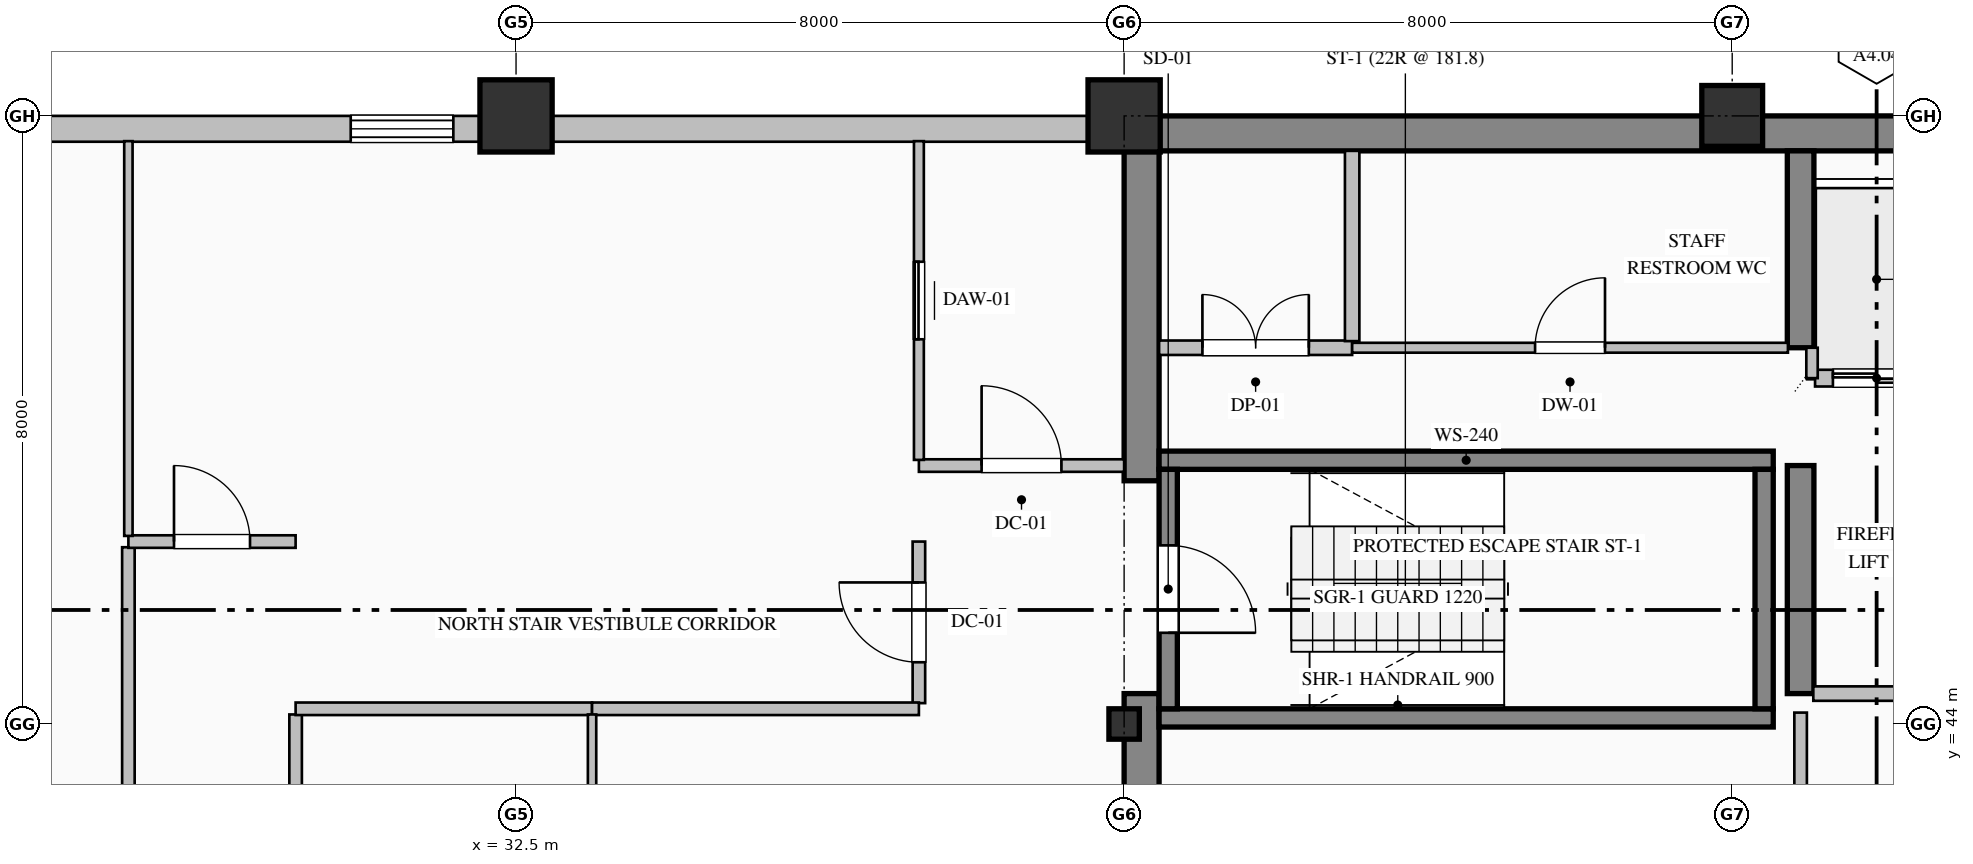
"""IFC4 building model, lengths in metres.
Left out: names, types, materials, properties, quantities, classifications, styles, units other than length and angle.
Written with IfcOpenShell. Run it as: python <this file> out.ifc"""

import sys

from ifc_helpers import new_model, si_unit, direction, frame, frame_2d, origin, origin_2d, place, context, subcontext, project, spatial, rectangle, hollow_rectangle, i_section, extrude, element, fill, save


model = new_model("IFC4")
c1 = context("Model", 3, precision=1e-05, world=origin(), true_north=direction((0.0, 1.0)))
c2 = subcontext(c1, "Body", "Model", "MODEL_VIEW")
j1 = project(units=[si_unit("LENGTHUNIT", "METRE"), si_unit("PLANEANGLEUNIT", "RADIAN")], contexts=[c1])
p1 = place(None, origin())
s1 = spatial("IfcSite", under=j1, at=p1, CompositionType="ELEMENT")
p2 = place(p1, origin())
s2 = spatial("IfcBuilding", under=s1, at=p2, CompositionType="ELEMENT")
p3 = place(p2, frame((0.0, 0.0, 277.8)))
s3 = spatial("IfcBuildingStorey", under=s2, at=p3, CompositionType="ELEMENT", Elevation=277.8)
p4 = place(p3, frame((40.5, 51.77, 0.0), z_axis=(0.0, 0.0, 1.0), x_axis=(1.0, 0.0, 0.0)))
e1 = element("IfcWall", 1, at=p4, inside=s3, PredefinedType="SHEAR", context=c2, shape_type="SweptSolid", body=[
    extrude(rectangle(XDim=23.5, YDim=0.46, at=frame_2d((11.75, 0.0))), origin(), (0.0, 0.0, 1.0), 3.65),
])
p5 = place(p3, frame((40.73, 36.46, 0.0), z_axis=(0.0, 0.0, 1.0), x_axis=(0.0, 1.0, 0.0)))
e2 = element("IfcWall", 2, at=p5, inside=s3, PredefinedType="SHEAR", context=c2, shape_type="SweptSolid", body=[
    extrude(rectangle(XDim=7.94, YDim=0.46, at=frame_2d((3.97, 0.0))), origin(), (0.0, 0.0, 1.0), 3.65),
])
p6 = place(p3, frame((40.73, 47.2, 0.0), z_axis=(0.0, 0.0, 1.0), x_axis=(0.0, 1.0, 0.0)))
e3 = element("IfcWall", 3, at=p6, inside=s3, PredefinedType="SHEAR", context=c2, shape_type="SweptSolid", body=[
    extrude(rectangle(XDim=4.34, YDim=0.46, at=frame_2d((2.17, 0.0))), origin(), (0.0, 0.0, 1.0), 3.65),
])
p7 = place(p3, frame((49.4, 44.4, 0.0), z_axis=(0.0, 0.0, 1.0), x_axis=(0.0, 1.0, 0.0)))
e4 = element("IfcWall", 4, at=p7, inside=s3, PredefinedType="SHEAR", context=c2, shape_type="SweptSolid", body=[
    extrude(rectangle(XDim=3.0, YDim=0.35, at=frame_2d((1.5, 0.0))), origin(), (0.0, 0.0, 1.0), 3.65),
])
p8 = place(p3, frame((49.4, 48.95, 0.0), z_axis=(0.0, 0.0, 1.0), x_axis=(0.0, 1.0, 0.0)))
e5 = element("IfcWall", 5, at=p8, inside=s3, PredefinedType="SHEAR", context=c2, shape_type="SweptSolid", body=[
    extrude(rectangle(XDim=2.59, YDim=0.35, at=frame_2d((1.295, 0.0))), origin(), (0.0, 0.0, 1.0), 3.65),
])
p9 = place(p3, frame((32.5, 52.0, 0.0), z_axis=(0.0, 0.0, 1.0), x_axis=(1.0, 0.0, 0.0)))
e6 = element("IfcColumn", 6, at=p9, inside=s3, PredefinedType="COLUMN", context=c2, shape_type="SweptSolid", body=[
    extrude(hollow_rectangle(XDim=0.95, YDim=0.95, WallThickness=0.036, at=origin_2d()), origin(), (0.0, 0.0, 1.0), 4.0),
])
p10 = place(p3, frame((40.5, 44.0, 0.0), z_axis=(0.0, 0.0, 1.0), x_axis=(1.0, 0.0, 0.0)))
e7 = element("IfcColumn", 7, at=p10, inside=s3, PredefinedType="COLUMN", context=c2, shape_type="SweptSolid", body=[
    extrude(i_section(OverallWidth=0.4, OverallDepth=0.4, WebThickness=0.013, FlangeThickness=0.021, FilletRadius=0.022, at=origin_2d()), origin(), (0.0, 0.0, 1.0), 4.0),
])
p11 = place(p3, frame((40.5, 52.0, 0.0), z_axis=(0.0, 0.0, 1.0), x_axis=(1.0, 0.0, 0.0)))
e8 = element("IfcColumn", 8, at=p11, inside=s3, PredefinedType="COLUMN", context=c2, shape_type="SweptSolid", body=[
    extrude(hollow_rectangle(XDim=0.95, YDim=0.95, WallThickness=0.036, at=origin_2d()), origin(), (0.0, 0.0, 1.0), 4.0),
])
p12 = place(p3, frame((48.5, 52.0, 0.0), z_axis=(0.0, 0.0, 1.0), x_axis=(1.0, 0.0, 0.0)))
e9 = element("IfcColumn", 9, at=p12, inside=s3, PredefinedType="COLUMN", context=c2, shape_type="SweptSolid", body=[
    extrude(hollow_rectangle(XDim=0.8, YDim=0.8, WallThickness=0.032, at=origin_2d()), origin(), (0.0, 0.0, 1.0), 4.0),
])
p13 = place(p3, frame((13.0, 51.83, 0.0), z_axis=(0.0, 0.0, 1.0), x_axis=(1.0, 0.0, 0.0)))
e10 = element("IfcWall", 10, at=p13, inside=s3, PredefinedType="SOLIDWALL", context=c2, shape_type="SweptSolid", body=[
    extrude(rectangle(XDim=27.52, YDim=0.34, at=frame_2d((13.76, 0.0))), origin(), (0.0, 0.0, 1.0), 3.2),
])
p14 = place(p13, frame((6.525, 0.0, 0.9)))
e11 = element("IfcOpeningElement", 11, at=p14, cuts=e10, PredefinedType="OPENING", context=c2, shape_type="SweptSolid", body=[
    extrude(rectangle(XDim=1.35, YDim=1.85, at=frame_2d((0.675, 0.925))), frame((0.0, 0.18, 0.0), z_axis=(0.0, -1.0, 0.0), x_axis=(1.0, 0.0, 0.0)), (0.0, 0.0, 1.0), 0.36),
])
p15 = place(p13, frame((17.325, 0.0, 0.9)))
e12 = element("IfcOpeningElement", 12, at=p15, cuts=e10, PredefinedType="OPENING", context=c2, shape_type="SweptSolid", body=[
    extrude(rectangle(XDim=1.35, YDim=1.85, at=frame_2d((0.675, 0.925))), frame((0.0, 0.18, 0.0), z_axis=(0.0, -1.0, 0.0), x_axis=(1.0, 0.0, 0.0)), (0.0, 0.0, 1.0), 0.36),
])
for number, where, z_axis, x_axis in (
    (13, (40.96, 47.47, 0.0), (0.0, 0.0, 1.0), (1.0, 0.0, 0.0)),
    (14, (49.04, 44.08, 0.0), (0.0, 0.0, 1.0), (-1.0, 0.0, 0.0)),
):
    element("IfcWall", number, at=place(p3, frame(where, z_axis=z_axis, x_axis=x_axis)), inside=s3, PredefinedType="SOLIDWALL", context=c2, shape_type="SweptSolid", body=[
        extrude(rectangle(XDim=8.08, YDim=0.24, at=frame_2d((4.04, 0.0))), origin(), (0.0, 0.0, 1.0), 4.0),
    ])
p16 = place(p3, frame((41.08, 47.35, 0.0), z_axis=(0.0, 0.0, 1.0), x_axis=(0.0, -1.0, 0.0)))
e15 = element("IfcWall", 15, at=p16, inside=s3, PredefinedType="SOLIDWALL", context=c2, shape_type="SweptSolid", body=[
    extrude(rectangle(XDim=3.15, YDim=0.24, at=frame_2d((1.575, 0.0))), origin(), (0.0, 0.0, 1.0), 4.0),
])
p17 = place(p16, frame((1.0, 0.0, 0.0)))
e16 = element("IfcOpeningElement", 16, at=p17, cuts=e15, PredefinedType="OPENING", context=c2, shape_type="SweptSolid", body=[
    extrude(rectangle(XDim=1.15, YDim=2.2, at=frame_2d((0.575, 1.1))), frame((0.0, 0.13, 0.0), z_axis=(0.0, -1.0, 0.0), x_axis=(1.0, 0.0, 0.0)), (0.0, 0.0, 1.0), 0.26),
])
p18 = place(p3, frame((48.92, 44.2, 0.0), z_axis=(0.0, 0.0, 1.0), x_axis=(0.0, 1.0, 0.0)))
e17 = element("IfcWall", 17, at=p18, inside=s3, PredefinedType="SOLIDWALL", context=c2, shape_type="SweptSolid", body=[
    extrude(rectangle(XDim=3.15, YDim=0.24, at=frame_2d((1.575, 0.0))), origin(), (0.0, 0.0, 1.0), 4.0),
])
p19 = place(p3, frame((54.71, 48.55, 0.0), z_axis=(0.0, 0.0, 1.0), x_axis=(-1.0, 0.0, 0.0)))
e18 = element("IfcWall", 18, at=p19, inside=s3, PredefinedType="PARTITIONING", context=c2, shape_type="SweptSolid", body=[
    extrude(rectangle(XDim=5.12, YDim=0.22, at=frame_2d((2.56, 0.0))), origin(), (0.0, 0.0, 1.0), 3.65),
])
p20 = place(p19, frame((3.735, 0.0, 0.0)))
e19 = element("IfcOpeningElement", 19, at=p20, cuts=e18, PredefinedType="OPENING", context=c2, shape_type="SweptSolid", body=[
    extrude(rectangle(XDim=1.15, YDim=2.2, at=frame_2d((0.575, 1.1))), frame((0.0, 0.12, 0.0), z_axis=(0.0, -1.0, 0.0), x_axis=(1.0, 0.0, 0.0)), (0.0, 0.0, 1.0), 0.24),
])
p21 = place(p19, frame((0.935, 0.0, 0.0)))
e20 = element("IfcOpeningElement", 20, at=p21, cuts=e18, PredefinedType="OPENING", context=c2, shape_type="SweptSolid", body=[
    extrude(rectangle(XDim=1.15, YDim=2.2, at=frame_2d((0.575, 1.1))), frame((0.0, 0.12, 0.0), z_axis=(0.0, -1.0, 0.0), x_axis=(1.0, 0.0, 0.0)), (0.0, 0.0, 1.0), 0.24),
])
p22 = place(p3, frame((49.55, 48.55, 0.0), z_axis=(0.0, 0.0, 1.0), x_axis=(0.0, 1.0, 0.0)))
e21 = element("IfcWall", 21, at=p22, inside=s3, PredefinedType="PARTITIONING", context=c2, shape_type="SweptSolid", body=[
    extrude(rectangle(XDim=0.4, YDim=0.15, at=frame_2d((0.2, 0.0))), origin(), (0.0, 0.0, 1.0), 3.65),
])
p23 = place(p3, frame((37.8, 47.4, 0.0), z_axis=(0.0, 0.0, 1.0), x_axis=(1.0, 0.0, 0.0)))
e22 = element("IfcWall", 22, at=p23, inside=s3, PredefinedType="PARTITIONING", context=c2, shape_type="SweptSolid", body=[
    extrude(rectangle(XDim=2.7, YDim=0.165, at=frame_2d((1.35, 0.0))), origin(), (0.0, 0.0, 1.0), 3.65),
])
p24 = place(p23, frame((0.825, 0.0, 0.0)))
e23 = element("IfcOpeningElement", 23, at=p24, cuts=e22, PredefinedType="OPENING", context=c2, shape_type="SweptSolid", body=[
    extrude(rectangle(XDim=1.05, YDim=2.15, at=frame_2d((0.525, 1.075))), frame((0.0, 0.093, 0.0), z_axis=(0.0, -1.0, 0.0), x_axis=(1.0, 0.0, 0.0)), (0.0, 0.0, 1.0), 0.185),
])
p25 = place(p3, frame((37.8, 44.274, 0.0), z_axis=(0.0, 0.0, 1.0), x_axis=(0.0, 1.0, 0.0)))
e24 = element("IfcWall", 24, at=p25, inside=s3, PredefinedType="PARTITIONING", context=c2, shape_type="SweptSolid", body=[
    extrude(rectangle(XDim=2.125, YDim=0.165, at=frame_2d((1.063, 0.0))), origin(), (0.0, 0.0, 1.0), 3.65),
])
p26 = place(p25, frame((0.538, 0.0, 0.0)))
e25 = element("IfcOpeningElement", 25, at=p26, cuts=e24, PredefinedType="OPENING", context=c2, shape_type="SweptSolid", body=[
    extrude(rectangle(XDim=1.05, YDim=2.15, at=frame_2d((0.525, 1.075))), frame((0.0, 0.093, 0.0), z_axis=(0.0, -1.0, 0.0), x_axis=(1.0, 0.0, 0.0)), (0.0, 0.0, 1.0), 0.185),
])
p27 = place(p3, frame((37.8, 47.475, 0.0), z_axis=(0.0, 0.0, 1.0), x_axis=(0.0, 1.0, 0.0)))
e26 = element("IfcWall", 26, at=p27, inside=s3, PredefinedType="PARTITIONING", context=c2, shape_type="SweptSolid", body=[
    extrude(rectangle(XDim=4.193, YDim=0.13, at=frame_2d((2.097, 0.0))), origin(), (0.0, 0.0, 1.0), 3.65),
])
p28 = place(p27, frame((1.587, 0.0, 0.0)))
e27 = element("IfcOpeningElement", 27, at=p28, cuts=e26, PredefinedType="OPENING", context=c2, shape_type="SweptSolid", body=[
    extrude(rectangle(XDim=1.02, YDim=2.15, at=frame_2d((0.51, 1.075))), frame((0.0, 0.075, 0.0), z_axis=(0.0, -1.0, 0.0), x_axis=(1.0, 0.0, 0.0)), (0.0, 0.0, 1.0), 0.15),
])
p29 = place(p3, frame((40.96, 48.95, 0.0), z_axis=(0.0, 0.0, 1.0), x_axis=(1.0, 0.0, 0.0)))
e28 = element("IfcWall", 28, at=p29, inside=s3, PredefinedType="PARTITIONING", context=c2, shape_type="SweptSolid", body=[
    extrude(rectangle(XDim=2.54, YDim=0.19, at=frame_2d((1.27, 0.0))), origin(), (0.0, 0.0, 1.0), 3.65),
])
p30 = place(p29, frame((0.57, 0.0, 0.0)))
e29 = element("IfcOpeningElement", 29, at=p30, cuts=e28, PredefinedType="OPENING", context=c2, shape_type="SweptSolid", body=[
    extrude(rectangle(XDim=1.4, YDim=2.25, at=frame_2d((0.7, 1.125))), frame((0.0, 0.105, 0.0), z_axis=(0.0, -1.0, 0.0), x_axis=(1.0, 0.0, 0.0)), (0.0, 0.0, 1.0), 0.21),
])
p31 = place(p3, frame((43.5, 48.95, 0.0), z_axis=(0.0, 0.0, 1.0), x_axis=(1.0, 0.0, 0.0)))
e30 = element("IfcWall", 30, at=p31, inside=s3, PredefinedType="PARTITIONING", context=c2, shape_type="SweptSolid", body=[
    extrude(rectangle(XDim=5.733, YDim=0.13, at=frame_2d((2.866, 0.0))), origin(), (0.0, 0.0, 1.0), 3.65),
])
p32 = place(p31, frame((2.406, 0.0, 0.0)))
e31 = element("IfcOpeningElement", 31, at=p32, cuts=e30, PredefinedType="OPENING", context=c2, shape_type="SweptSolid", body=[
    extrude(rectangle(XDim=0.92, YDim=2.15, at=frame_2d((0.46, 1.075))), frame((0.0, 0.075, 0.0), z_axis=(0.0, -1.0, 0.0), x_axis=(1.0, 0.0, 0.0)), (0.0, 0.0, 1.0), 0.15),
])
p33 = place(p3, frame((54.733, 44.4, 0.0), z_axis=(0.0, 0.0, 1.0), x_axis=(-1.0, 0.0, 0.0)))
e32 = element("IfcWall", 32, at=p33, inside=s3, PredefinedType="PARTITIONING", context=c2, shape_type="SweptSolid", body=[
    extrude(rectangle(XDim=5.166, YDim=0.19, at=frame_2d((2.583, 0.0))), origin(), (0.0, 0.0, 1.0), 3.65),
])
p34 = place(p33, frame((2.058, 0.0, 0.0)))
e33 = element("IfcOpeningElement", 33, at=p34, cuts=e32, PredefinedType="OPENING", context=c2, shape_type="SweptSolid", body=[
    extrude(rectangle(XDim=1.05, YDim=2.15, at=frame_2d((0.525, 1.075))), frame((0.0, 0.105, 0.0), z_axis=(0.0, -1.0, 0.0), x_axis=(1.0, 0.0, 0.0)), (0.0, 0.0, 1.0), 0.21),
])
p35 = place(p3, frame((49.4, 36.46, 0.0), z_axis=(0.0, 0.0, 1.0), x_axis=(0.0, 1.0, 0.0)))
e34 = element("IfcWall", 34, at=p35, inside=s3, PredefinedType="PARTITIONING", context=c2, shape_type="SweptSolid", body=[
    extrude(rectangle(XDim=7.69, YDim=0.165, at=frame_2d((3.845, 0.0))), origin(), (0.0, 0.0, 1.0), 2.892),
])
p36 = place(p35, frame((3.345, 0.0, 0.0)))
e35 = element("IfcOpeningElement", 35, at=p36, cuts=e34, PredefinedType="OPENING", context=c2, shape_type="SweptSolid", body=[
    extrude(rectangle(XDim=1.0, YDim=2.15, at=frame_2d((0.5, 1.075))), frame((0.0, 0.093, 0.0), z_axis=(0.0, -1.0, 0.0), x_axis=(1.0, 0.0, 0.0)), (0.0, 0.0, 1.0), 0.185),
])
p37 = place(p3, frame((43.5, 51.54, 0.0), z_axis=(0.0, 0.0, 1.0), x_axis=(0.0, -1.0, 0.0)))
e36 = element("IfcWall", 36, at=p37, inside=s3, PredefinedType="PARTITIONING", context=c2, shape_type="SweptSolid", body=[
    extrude(rectangle(XDim=2.503, YDim=0.19, at=frame_2d((1.251, 0.0))), origin(), (0.0, 0.0, 1.0), 3.65),
])
p38 = place(p3, frame((27.4, 32.675, 0.0), z_axis=(0.0, 0.0, 1.0), x_axis=(0.0, 1.0, 0.0)))
e37 = element("IfcWall", 37, at=p38, inside=s3, PredefinedType="PARTITIONING", context=c2, shape_type="SweptSolid", body=[
    extrude(rectangle(XDim=13.651, YDim=0.165, at=frame_2d((6.825, 0.0))), origin(), (0.0, 0.0, 1.0), 3.65),
])
p39 = place(p38, frame((6.275, 0.0, 0.0)))
e38 = element("IfcOpeningElement", 38, at=p39, cuts=e37, PredefinedType="OPENING", context=c2, shape_type="SweptSolid", body=[
    extrude(rectangle(XDim=1.1, YDim=2.2, at=frame_2d((0.55, 1.1))), frame((0.0, 0.093, 0.0), z_axis=(0.0, -1.0, 0.0), x_axis=(1.0, 0.0, 0.0)), (0.0, 0.0, 1.0), 0.185),
])
p40 = place(p3, frame((27.4, 46.4, 0.0), z_axis=(0.0, 0.0, 1.0), x_axis=(1.0, 0.0, 0.0)))
e39 = element("IfcWall", 39, at=p40, inside=s3, PredefinedType="PARTITIONING", context=c2, shape_type="SweptSolid", body=[
    extrude(rectangle(XDim=2.2, YDim=0.165, at=frame_2d((1.1, 0.0))), origin(), (0.0, 0.0, 1.0), 3.65),
])
p41 = place(p40, frame((0.6, 0.0, 0.0)))
e40 = element("IfcOpeningElement", 40, at=p41, cuts=e39, PredefinedType="OPENING", context=c2, shape_type="SweptSolid", body=[
    extrude(rectangle(XDim=1.0, YDim=2.15, at=frame_2d((0.5, 1.075))), frame((0.0, 0.093, 0.0), z_axis=(0.0, -1.0, 0.0), x_axis=(1.0, 0.0, 0.0)), (0.0, 0.0, 1.0), 0.185),
])
p42 = place(p3, frame((29.6, 44.125, 0.0), z_axis=(0.0, 0.0, 1.0), x_axis=(0.0, -1.0, 0.0)))
e41 = element("IfcWall", 41, at=p42, inside=s3, PredefinedType="PARTITIONING", context=c2, shape_type="SweptSolid", body=[
    extrude(rectangle(XDim=11.451, YDim=0.165, at=frame_2d((5.726, 0.0))), origin(), (0.0, 0.0, 1.0), 3.65),
])
p43 = place(p42, frame((5.236, 0.0, 0.0)))
e42 = element("IfcOpeningElement", 42, at=p43, cuts=e41, PredefinedType="OPENING", context=c2, shape_type="SweptSolid", body=[
    extrude(rectangle(XDim=0.98, YDim=2.25, at=frame_2d((0.49, 1.125))), frame((0.0, 0.093, 0.0), z_axis=(0.0, -1.0, 0.0), x_axis=(1.0, 0.0, 0.0)), (0.0, 0.0, 1.0), 0.185),
])
p44 = place(p3, frame((33.5, 44.2, 0.0), z_axis=(0.0, 0.0, 1.0), x_axis=(-1.0, 0.0, 0.0)))
e43 = element("IfcWall", 43, at=p44, inside=s3, PredefinedType="PARTITIONING", context=c2, shape_type="SweptSolid", body=[
    extrude(rectangle(XDim=3.9, YDim=0.165, at=frame_2d((1.95, 0.0))), origin(), (0.0, 0.0, 1.0), 3.65),
])
p45 = place(p3, frame((37.8, 44.2, 0.0), z_axis=(0.0, 0.0, 1.0), x_axis=(-1.0, 0.0, 0.0)))
e44 = element("IfcWall", 44, at=p45, inside=s3, PredefinedType="PARTITIONING", context=c2, shape_type="SweptSolid", body=[
    extrude(rectangle(XDim=4.3, YDim=0.165, at=frame_2d((2.15, 0.0))), origin(), (0.0, 0.0, 1.0), 3.65),
])
p46 = place(p3, frame((27.4, 51.668, 0.0), z_axis=(0.0, 0.0, 1.0), x_axis=(0.0, -1.0, 0.0)))
e45 = element("IfcWall", 45, at=p46, inside=s3, PredefinedType="MOVABLE", context=c2, shape_type="SweptSolid", body=[
    extrude(rectangle(XDim=5.193, YDim=0.11, at=frame_2d((2.597, 0.0))), origin(), (0.0, 0.0, 1.0), 3.65),
])
p47 = place(p3, frame((33.5, 44.125, 0.0), z_axis=(0.0, 0.0, 1.0), x_axis=(0.0, -1.0, 0.0)))
e46 = element("IfcWall", 46, at=p47, inside=s3, PredefinedType="MOVABLE", context=c2, shape_type="SweptSolid", body=[
    extrude(rectangle(XDim=11.451, YDim=0.11, at=frame_2d((5.726, 0.0))), origin(), (0.0, 0.0, 1.0), 3.65),
])
p48 = place(p15, origin())
e47 = element("IfcWindow", 47, at=p48, inside=s3, PartitioningType="DOUBLE_PANEL_VERTICAL", PredefinedType="WINDOW", context=c2, shape_type="SweptSolid", body=[
    extrude(rectangle(XDim=1.35, YDim=1.85, at=frame_2d((0.675, 0.925))), frame((0.0, 0.15, 0.0), z_axis=(0.0, -1.0, 0.0), x_axis=(1.0, 0.0, 0.0)), (0.0, 0.0, 1.0), 0.06),
])
fill(e12, e47)
p49 = place(p17, origin())
e48 = element("IfcDoor", 48, at=p49, inside=s3, OperationType="SINGLE_SWING_RIGHT", PredefinedType="DOOR", context=c2, shape_type="SweptSolid", body=[
    extrude(rectangle(XDim=1.15, YDim=2.2, at=frame_2d((0.575, 1.1))), frame((0.0, 0.025, 0.0), z_axis=(0.0, -1.0, 0.0), x_axis=(1.0, 0.0, 0.0)), (0.0, 0.0, 1.0), 0.05),
])
fill(e16, e48)
p50 = place(p20, origin())
e49 = element("IfcDoor", 49, at=p50, inside=s3, OperationType="DOUBLE_DOOR_SLIDING", PredefinedType="DOOR", context=c2, shape_type="SweptSolid", body=[
    extrude(rectangle(XDim=1.15, YDim=2.2, at=frame_2d((0.575, 1.1))), frame((0.0, 0.025, 0.0), z_axis=(0.0, -1.0, 0.0), x_axis=(1.0, 0.0, 0.0)), (0.0, 0.0, 1.0), 0.05),
])
fill(e19, e49)
p51 = place(p24, origin())
e50 = element("IfcDoor", 50, at=p51, inside=s3, OperationType="SINGLE_SWING_LEFT", PredefinedType="DOOR", context=c2, shape_type="SweptSolid", body=[
    extrude(rectangle(XDim=1.05, YDim=2.15, at=frame_2d((0.525, 1.075))), frame((0.0, 0.025, 0.0), z_axis=(0.0, -1.0, 0.0), x_axis=(1.0, 0.0, 0.0)), (0.0, 0.0, 1.0), 0.05),
])
fill(e23, e50)
p52 = place(p26, origin())
e51 = element("IfcDoor", 51, at=p52, inside=s3, OperationType="SINGLE_SWING_RIGHT", PredefinedType="DOOR", context=c2, shape_type="SweptSolid", body=[
    extrude(rectangle(XDim=1.05, YDim=2.15, at=frame_2d((0.525, 1.075))), frame((0.0, 0.025, 0.0), z_axis=(0.0, -1.0, 0.0), x_axis=(1.0, 0.0, 0.0)), (0.0, 0.0, 1.0), 0.05),
])
fill(e25, e51)
p53 = place(p28, origin())
e52 = element("IfcDoor", 52, at=p53, inside=s3, OperationType="SLIDING_TO_LEFT", PredefinedType="DOOR", context=c2, shape_type="SweptSolid", body=[
    extrude(rectangle(XDim=1.02, YDim=2.15, at=frame_2d((0.51, 1.075))), frame((0.0, 0.025, 0.0), z_axis=(0.0, -1.0, 0.0), x_axis=(1.0, 0.0, 0.0)), (0.0, 0.0, 1.0), 0.05),
])
fill(e27, e52)
p54 = place(p30, origin())
e53 = element("IfcDoor", 53, at=p54, inside=s3, OperationType="DOUBLE_DOOR_SINGLE_SWING", PredefinedType="DOOR", context=c2, shape_type="SweptSolid", body=[
    extrude(rectangle(XDim=1.4, YDim=2.25, at=frame_2d((0.7, 1.125))), frame((0.0, 0.025, 0.0), z_axis=(0.0, -1.0, 0.0), x_axis=(1.0, 0.0, 0.0)), (0.0, 0.0, 1.0), 0.05),
])
fill(e29, e53)
p55 = place(p32, origin())
e54 = element("IfcDoor", 54, at=p55, inside=s3, OperationType="SINGLE_SWING_RIGHT", PredefinedType="DOOR", context=c2, shape_type="SweptSolid", body=[
    extrude(rectangle(XDim=0.92, YDim=2.15, at=frame_2d((0.46, 1.075))), frame((0.0, 0.025, 0.0), z_axis=(0.0, -1.0, 0.0), x_axis=(1.0, 0.0, 0.0)), (0.0, 0.0, 1.0), 0.05),
])
fill(e31, e54)
p56 = place(p41, origin())
e55 = element("IfcDoor", 55, at=p56, inside=s3, OperationType="SINGLE_SWING_LEFT", PredefinedType="DOOR", context=c2, shape_type="SweptSolid", body=[
    extrude(rectangle(XDim=1.0, YDim=2.15, at=frame_2d((0.5, 1.075))), frame((0.0, 0.025, 0.0), z_axis=(0.0, -1.0, 0.0), x_axis=(1.0, 0.0, 0.0)), (0.0, 0.0, 1.0), 0.05),
])
fill(e40, e55)
save(model, sys.argv[1])
